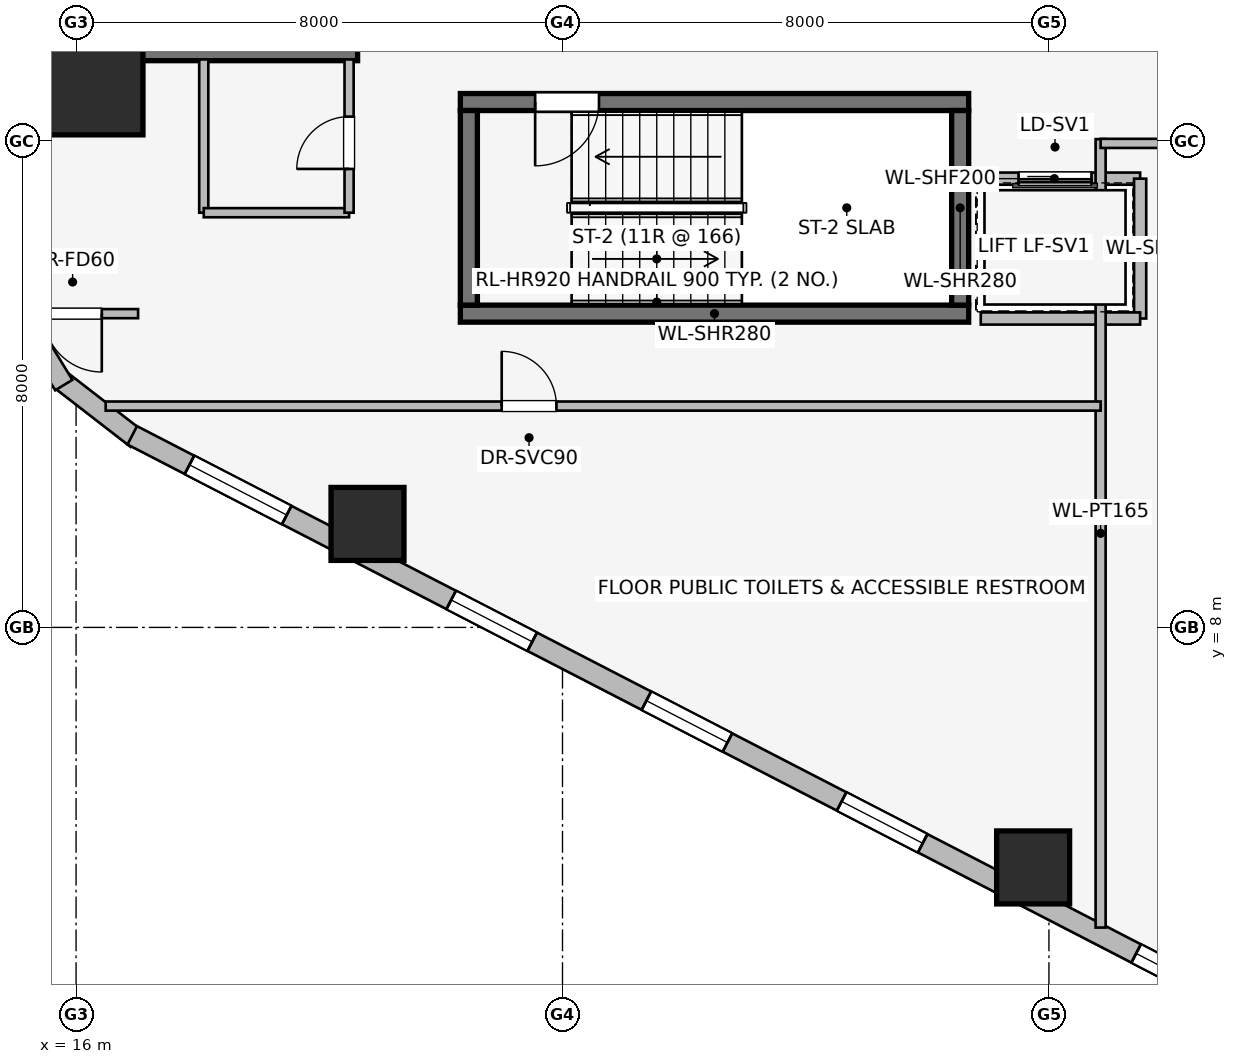
"""IFC4 building model, lengths in metres.
Left out: names, types, materials, properties, quantities, classifications, styles, units other than length and angle.
Written with IfcOpenShell. Run it as: python <this file> out.ifc"""

import sys

from ifc_helpers import new_model, si_unit, direction, frame, frame_2d, origin, origin_2d, place, context, subcontext, project, spatial, rectangle, extrude, element, fill, save


model = new_model("IFC4")
c1 = context("Model", 3, precision=1e-05, world=origin(), true_north=direction((0.0, 1.0)))
c2 = subcontext(c1, "Body", "Model", "MODEL_VIEW")
j1 = project(units=[si_unit("LENGTHUNIT", "METRE"), si_unit("PLANEANGLEUNIT", "RADIAN")], contexts=[c1])
p1 = place(None, origin())
s1 = spatial("IfcSite", under=j1, at=p1, CompositionType="ELEMENT")
p2 = place(p1, origin())
s2 = spatial("IfcBuilding", under=s1, at=p2, CompositionType="ELEMENT")
p3 = place(p2, frame((0.0, 0.0, 45.25)))
s3 = spatial("IfcBuildingStorey", under=s2, at=p3, CompositionType="ELEMENT", Elevation=45.25)
p4 = place(p3, frame((16.87, 17.46, 0.0), z_axis=(0.0, 0.0, 1.0), x_axis=(1.0, 0.0, 0.0)))
e1 = element("IfcWall", 1, at=p4, inside=s3, PredefinedType="SHEAR", context=c2, shape_type="SweptSolid", body=[
    extrude(rectangle(XDim=3.76, YDim=0.28, at=frame_2d((1.88, 0.0))), origin(), (0.0, 0.0, 1.0), 3.65),
])
p5 = place(p3, frame((22.32, 13.16, 0.0), z_axis=(0.0, 0.0, 1.0), x_axis=(1.0, 0.0, 0.0)))
e2 = element("IfcWall", 2, at=p5, inside=s3, PredefinedType="SHEAR", context=c2, shape_type="SweptSolid", body=[
    extrude(rectangle(XDim=8.36, YDim=0.28, at=frame_2d((4.18, 0.0))), origin(), (0.0, 0.0, 1.0), 3.65),
])
p6 = place(p3, frame((30.68, 16.64, 0.0), z_axis=(0.0, 0.0, 1.0), x_axis=(-1.0, 0.0, 0.0)))
e3 = element("IfcWall", 3, at=p6, inside=s3, PredefinedType="SHEAR", context=c2, shape_type="SweptSolid", body=[
    extrude(rectangle(XDim=8.36, YDim=0.28, at=frame_2d((4.18, 0.0))), origin(), (0.0, 0.0, 1.0), 3.65),
])
p7 = place(p6, frame((6.08, 0.0, 0.0)))
e4 = element("IfcOpeningElement", 4, at=p7, cuts=e3, PredefinedType="OPENING", context=c2, shape_type="SweptSolid", body=[
    extrude(rectangle(XDim=1.05, YDim=2.0, at=frame_2d((0.525, 1.0))), frame((0.0, 0.15, 0.0), z_axis=(0.0, -1.0, 0.0), x_axis=(1.0, 0.0, 0.0)), (0.0, 0.0, 1.0), 0.3),
])
for number, where, z_axis, x_axis in (
    (5, (22.46, 16.5, 0.0), (0.0, 0.0, 1.0), (0.0, -1.0, 0.0)),
    (6, (30.54, 13.3, 0.0), (0.0, 0.0, 1.0), (0.0, 1.0, 0.0)),
):
    element("IfcWall", number, at=place(p3, frame(where, z_axis=z_axis, x_axis=x_axis)), inside=s3, PredefinedType="SHEAR", context=c2, shape_type="SweptSolid", body=[
        extrude(rectangle(XDim=3.2, YDim=0.28, at=frame_2d((1.6, 0.0))), origin(), (0.0, 0.0, 1.0), 3.65),
    ])
p8 = place(p3, frame((16.3, 16.9, 0.0), z_axis=(0.0, 0.0, 1.0), x_axis=(1.0, 0.0, 0.0)))
e7 = element("IfcColumn", 7, at=p8, inside=s3, PredefinedType="COLUMN", context=c2, shape_type="SweptSolid", body=[
    extrude(rectangle(XDim=1.6, YDim=1.6, at=origin_2d()), origin(), (0.0, 0.0, 1.0), 3.65),
])
for number, where, z_axis, x_axis in (
    (8, (20.793, 9.702, 0.0), (0.0, 0.0, 1.0), (1.0, 0.0, 0.0)),
    (9, (31.74, 4.053, 0.0), (0.0, 0.0, 1.0), (1.0, 0.0, 0.0)),
):
    element("IfcColumn", number, at=place(p3, frame(where, z_axis=z_axis, x_axis=x_axis)), inside=s3, PredefinedType="COLUMN", context=c2, shape_type="SweptSolid", body=[
        extrude(rectangle(XDim=1.2, YDim=1.2, at=origin_2d()), origin(), (0.0, 0.0, 1.0), 3.65),
    ])
p9 = place(p3, frame((16.998, 11.099, 0.0), z_axis=(0.0, 0.0, 1.0), x_axis=(-0.790691856293, 0.61221433207, 0.0)))
e10 = element("IfcWall", 10, at=p9, inside=s3, PredefinedType="STANDARD", context=c2, shape_type="SweptSolid", body=[
    extrude(rectangle(XDim=1.676, YDim=0.33, at=frame_2d((0.838, 0.0))), origin(), (0.0, 0.0, 1.0), 3.39),
])
p10 = place(p3, frame((15.798, 11.985, 0.0), z_axis=(0.0, 0.0, 1.0), x_axis=(-0.520584129191, 0.853810379671, 0.0)))
e11 = element("IfcWall", 11, at=p10, inside=s3, PredefinedType="STANDARD", context=c2, shape_type="SweptSolid", body=[
    extrude(rectangle(XDim=1.677, YDim=0.33, at=frame_2d((0.838, 0.0))), origin(), (0.0, 0.0, 1.0), 3.39),
])
p11 = place(p3, frame((35.169, 1.743, 0.0), z_axis=(0.0, 0.0, 1.0), x_axis=(-0.888634413993, 0.458616264721, 0.0)))
e12 = element("IfcWall", 12, at=p11, inside=s3, PredefinedType="STANDARD", context=c2, shape_type="SweptSolid", body=[
    extrude(rectangle(XDim=20.531, YDim=0.34, at=frame_2d((10.266, 0.0))), origin(), (0.0, 0.0, 1.0), 2.684),
])
p12 = place(p11, frame((0.902, 0.0, 0.75)))
e13 = element("IfcOpeningElement", 13, at=p12, cuts=e12, PredefinedType="OPENING", context=c2, shape_type="SweptSolid", body=[
    extrude(rectangle(XDim=1.05, YDim=1.4, at=frame_2d((0.525, 0.7))), frame((0.0, 0.18, 0.0), z_axis=(0.0, -1.0, 0.0), x_axis=(1.0, 0.0, 0.0)), (0.0, 0.0, 1.0), 0.36),
])
p13 = place(p11, frame((5.903, 0.0, 0.75)))
e14 = element("IfcOpeningElement", 14, at=p13, cuts=e12, PredefinedType="OPENING", context=c2, shape_type="SweptSolid", body=[
    extrude(rectangle(XDim=1.5, YDim=1.5, at=frame_2d((0.75, 0.75))), frame((0.0, 0.18, 0.0), z_axis=(0.0, -1.0, 0.0), x_axis=(1.0, 0.0, 0.0)), (0.0, 0.0, 1.0), 0.36),
])
p14 = place(p11, frame((9.516, 0.0, 0.75)))
e15 = element("IfcOpeningElement", 15, at=p14, cuts=e12, PredefinedType="OPENING", context=c2, shape_type="SweptSolid", body=[
    extrude(rectangle(XDim=1.5, YDim=1.5, at=frame_2d((0.75, 0.75))), frame((0.0, 0.18, 0.0), z_axis=(0.0, -1.0, 0.0), x_axis=(1.0, 0.0, 0.0)), (0.0, 0.0, 1.0), 0.36),
])
p15 = place(p11, frame((13.129, 0.0, 0.75)))
e16 = element("IfcOpeningElement", 16, at=p15, cuts=e12, PredefinedType="OPENING", context=c2, shape_type="SweptSolid", body=[
    extrude(rectangle(XDim=1.5, YDim=1.5, at=frame_2d((0.75, 0.75))), frame((0.0, 0.18, 0.0), z_axis=(0.0, -1.0, 0.0), x_axis=(1.0, 0.0, 0.0)), (0.0, 0.0, 1.0), 0.36),
])
p16 = place(p11, frame((17.673, 0.0, 0.75)))
e17 = element("IfcOpeningElement", 17, at=p16, cuts=e12, PredefinedType="OPENING", context=c2, shape_type="SweptSolid", body=[
    extrude(rectangle(XDim=1.8, YDim=1.5, at=frame_2d((0.9, 0.75))), frame((0.0, 0.18, 0.0), z_axis=(0.0, -1.0, 0.0), x_axis=(1.0, 0.0, 0.0)), (0.0, 0.0, 1.0), 0.36),
])
p17 = place(p3, frame((33.5, 15.38, 0.0), z_axis=(0.0, 0.0, 1.0), x_axis=(-1.0, 0.0, 0.0)))
e18 = element("IfcWall", 18, at=p17, inside=s3, PredefinedType="PARTITIONING", context=c2, shape_type="SweptSolid", body=[
    extrude(rectangle(XDim=2.82, YDim=0.2, at=frame_2d((1.41, 0.0))), origin(), (0.0, 0.0, 1.0), 3.39),
])
p18 = place(p17, frame((0.8, 0.0, 0.0)))
e19 = element("IfcOpeningElement", 19, at=p18, cuts=e18, PredefinedType="OPENING", context=c2, shape_type="SweptSolid", body=[
    extrude(rectangle(XDim=1.2, YDim=2.2, at=frame_2d((0.6, 1.1))), frame((0.0, 0.11, 0.0), z_axis=(0.0, -1.0, 0.0), x_axis=(1.0, 0.0, 0.0)), (0.0, 0.0, 1.0), 0.22),
])
p19 = place(p3, frame((33.5, 13.08, 0.0), z_axis=(0.0, 0.0, 1.0), x_axis=(0.0, 1.0, 0.0)))
e20 = element("IfcWall", 20, at=p19, inside=s3, PredefinedType="PARTITIONING", context=c2, shape_type="SweptSolid", body=[
    extrude(rectangle(XDim=2.3, YDim=0.2, at=frame_2d((1.15, 0.0))), origin(), (0.0, 0.0, 1.0), 3.39),
])
p20 = place(p3, frame((30.879, 13.08, 0.0), z_axis=(0.0, 0.0, 1.0), x_axis=(1.0, 0.0, 0.0)))
e21 = element("IfcWall", 21, at=p20, inside=s3, PredefinedType="PARTITIONING", context=c2, shape_type="SweptSolid", body=[
    extrude(rectangle(XDim=2.621, YDim=0.2, at=frame_2d((1.311, 0.0))), origin(), (0.0, 0.0, 1.0), 3.39),
])
p21 = place(p3, frame((18.1, 17.34, 0.0), z_axis=(0.0, 0.0, 1.0), x_axis=(0.0, -1.0, 0.0)))
e22 = element("IfcWall", 22, at=p21, inside=s3, PredefinedType="PARTITIONING", context=c2, shape_type="SweptSolid", body=[
    extrude(rectangle(XDim=2.52, YDim=0.15, at=frame_2d((1.26, 0.0))), origin(), (0.0, 0.0, 1.0), 3.39),
])
p22 = place(p3, frame((18.1, 14.82, 0.0), z_axis=(0.0, 0.0, 1.0), x_axis=(1.0, 0.0, 0.0)))
e23 = element("IfcWall", 23, at=p22, inside=s3, PredefinedType="PARTITIONING", context=c2, shape_type="SweptSolid", body=[
    extrude(rectangle(XDim=2.39, YDim=0.15, at=frame_2d((1.195, 0.0))), origin(), (0.0, 0.0, 1.0), 3.39),
])
p23 = place(p3, frame((20.49, 14.82, 0.0), z_axis=(0.0, 0.0, 1.0), x_axis=(0.0, 1.0, 0.0)))
e24 = element("IfcWall", 24, at=p23, inside=s3, PredefinedType="PARTITIONING", context=c2, shape_type="SweptSolid", body=[
    extrude(rectangle(XDim=2.52, YDim=0.15, at=frame_2d((1.26, 0.0))), origin(), (0.0, 0.0, 1.0), 3.39),
])
p24 = place(p23, frame((0.72, 0.0, 0.0)))
e25 = element("IfcOpeningElement", 25, at=p24, cuts=e24, PredefinedType="OPENING", context=c2, shape_type="SweptSolid", body=[
    extrude(rectangle(XDim=0.86, YDim=2.0, at=frame_2d((0.43, 1.0))), frame((0.0, 0.085, 0.0), z_axis=(0.0, -1.0, 0.0), x_axis=(1.0, 0.0, 0.0)), (0.0, 0.0, 1.0), 0.17),
])
p25 = place(p3, frame((32.85, 3.064, 0.0), z_axis=(0.0, 0.0, 1.0), x_axis=(0.0, 1.0, 0.0)))
e26 = element("IfcWall", 26, at=p25, inside=s3, PredefinedType="PARTITIONING", context=c2, shape_type="SweptSolid", body=[
    extrude(rectangle(XDim=12.966, YDim=0.165, at=frame_2d((6.483, 0.0))), origin(), (0.0, 0.0, 1.0), 3.39),
])
p26 = place(p3, frame((16.487, 11.64, 0.0), z_axis=(0.0, 0.0, 1.0), x_axis=(1.0, 0.0, 0.0)))
e27 = element("IfcWall", 27, at=p26, inside=s3, PredefinedType="PARTITIONING", context=c2, shape_type="SweptSolid", body=[
    extrude(rectangle(XDim=16.363, YDim=0.15, at=frame_2d((8.182, 0.0))), origin(), (0.0, 0.0, 1.0), 3.39),
])
p27 = place(p26, frame((6.513, 0.0, 0.0)))
e28 = element("IfcOpeningElement", 28, at=p27, cuts=e27, PredefinedType="OPENING", context=c2, shape_type="SweptSolid", body=[
    extrude(rectangle(XDim=0.9, YDim=2.0, at=frame_2d((0.45, 1.0))), frame((0.0, 0.085, 0.0), z_axis=(0.0, -1.0, 0.0), x_axis=(1.0, 0.0, 0.0)), (0.0, 0.0, 1.0), 0.17),
])
p28 = place(p3, frame((17.02, 13.16, 0.0), z_axis=(0.0, 0.0, 1.0), x_axis=(-1.0, 0.0, 0.0)))
e29 = element("IfcWall", 29, at=p28, inside=s3, PredefinedType="PARTITIONING", context=c2, shape_type="SweptSolid", body=[
    extrude(rectangle(XDim=2.12, YDim=0.15, at=frame_2d((1.06, 0.0))), origin(), (0.0, 0.0, 1.0), 3.39),
])
p29 = place(p28, frame((0.597, 0.0, 0.0)))
e30 = element("IfcOpeningElement", 30, at=p29, cuts=e29, PredefinedType="OPENING", context=c2, shape_type="SweptSolid", body=[
    extrude(rectangle(XDim=0.96, YDim=2.0, at=frame_2d((0.48, 1.0))), frame((0.0, 0.085, 0.0), z_axis=(0.0, -1.0, 0.0), x_axis=(1.0, 0.0, 0.0)), (0.0, 0.0, 1.0), 0.17),
])
p30 = place(p3, frame((32.85, 15.96, 0.0), z_axis=(0.0, 0.0, 1.0), x_axis=(1.0, 0.0, 0.0)))
e31 = element("IfcWall", 31, at=p30, inside=s3, PredefinedType="PARTITIONING", context=c2, shape_type="SweptSolid", body=[
    extrude(rectangle(XDim=5.461, YDim=0.15, at=frame_2d((2.73, 0.0))), origin(), (0.0, 0.0, 1.0), 3.39),
])
p31 = place(p30, frame((2.251, 0.0, 0.0)))
e32 = element("IfcOpeningElement", 32, at=p31, cuts=e31, PredefinedType="OPENING", context=c2, shape_type="SweptSolid", body=[
    extrude(rectangle(XDim=0.96, YDim=2.0, at=frame_2d((0.48, 1.0))), frame((0.0, 0.085, 0.0), z_axis=(0.0, -1.0, 0.0), x_axis=(1.0, 0.0, 0.0)), (0.0, 0.0, 1.0), 0.17),
])
p32 = place(p12, origin())
e33 = element("IfcWindow", 33, at=p32, inside=s3, PartitioningType="SINGLE_PANEL", PredefinedType="WINDOW", context=c2, shape_type="SweptSolid", body=[
    extrude(rectangle(XDim=1.05, YDim=1.4, at=frame_2d((0.525, 0.7))), frame((0.0, 0.03, 0.0), z_axis=(0.0, -1.0, 0.0), x_axis=(1.0, 0.0, 0.0)), (0.0, 0.0, 1.0), 0.06),
])
fill(e13, e33)
p33 = place(p13, origin())
e34 = element("IfcWindow", 34, at=p33, inside=s3, PartitioningType="SINGLE_PANEL", PredefinedType="WINDOW", context=c2, shape_type="SweptSolid", body=[
    extrude(rectangle(XDim=1.5, YDim=1.5, at=frame_2d((0.75, 0.75))), frame((0.0, 0.03, 0.0), z_axis=(0.0, -1.0, 0.0), x_axis=(1.0, 0.0, 0.0)), (0.0, 0.0, 1.0), 0.06),
])
fill(e14, e34)
p34 = place(p14, origin())
e35 = element("IfcWindow", 35, at=p34, inside=s3, PartitioningType="SINGLE_PANEL", PredefinedType="WINDOW", context=c2, shape_type="SweptSolid", body=[
    extrude(rectangle(XDim=1.5, YDim=1.5, at=frame_2d((0.75, 0.75))), frame((0.0, 0.03, 0.0), z_axis=(0.0, -1.0, 0.0), x_axis=(1.0, 0.0, 0.0)), (0.0, 0.0, 1.0), 0.06),
])
fill(e15, e35)
p35 = place(p15, origin())
e36 = element("IfcWindow", 36, at=p35, inside=s3, PartitioningType="SINGLE_PANEL", PredefinedType="WINDOW", context=c2, shape_type="SweptSolid", body=[
    extrude(rectangle(XDim=1.5, YDim=1.5, at=frame_2d((0.75, 0.75))), frame((0.0, 0.03, 0.0), z_axis=(0.0, -1.0, 0.0), x_axis=(1.0, 0.0, 0.0)), (0.0, 0.0, 1.0), 0.06),
])
fill(e16, e36)
p36 = place(p16, origin())
e37 = element("IfcWindow", 37, at=p36, inside=s3, PartitioningType="SINGLE_PANEL", PredefinedType="WINDOW", context=c2, shape_type="SweptSolid", body=[
    extrude(rectangle(XDim=1.8, YDim=1.5, at=frame_2d((0.9, 0.75))), frame((0.0, 0.03, 0.0), z_axis=(0.0, -1.0, 0.0), x_axis=(1.0, 0.0, 0.0)), (0.0, 0.0, 1.0), 0.06),
])
fill(e17, e37)
p37 = place(p7, origin())
e38 = element("IfcDoor", 38, at=p37, inside=s3, OperationType="SINGLE_SWING_RIGHT", PredefinedType="DOOR", context=c2, shape_type="SweptSolid", body=[
    extrude(rectangle(XDim=1.05, YDim=2.0, at=frame_2d((0.525, 1.0))), frame((0.0, 0.025, 0.0), z_axis=(0.0, -1.0, 0.0), x_axis=(1.0, 0.0, 0.0)), (0.0, 0.0, 1.0), 0.05),
])
fill(e4, e38)
p38 = place(p18, origin())
e39 = element("IfcDoor", 39, at=p38, inside=s3, OperationType="SLIDING_TO_RIGHT", PredefinedType="DOOR", context=c2, shape_type="SweptSolid", body=[
    extrude(rectangle(XDim=1.2, YDim=2.2, at=frame_2d((0.6, 1.1))), frame((0.0, 0.025, 0.0), z_axis=(0.0, -1.0, 0.0), x_axis=(1.0, 0.0, 0.0)), (0.0, 0.0, 1.0), 0.05),
])
fill(e19, e39)
p39 = place(p24, origin())
e40 = element("IfcDoor", 40, at=p39, inside=s3, OperationType="SINGLE_SWING_LEFT", PredefinedType="DOOR", context=c2, shape_type="SweptSolid", body=[
    extrude(rectangle(XDim=0.86, YDim=2.0, at=frame_2d((0.43, 1.0))), frame((0.0, 0.025, 0.0), z_axis=(0.0, -1.0, 0.0), x_axis=(1.0, 0.0, 0.0)), (0.0, 0.0, 1.0), 0.05),
])
fill(e25, e40)
p40 = place(p27, origin())
e41 = element("IfcDoor", 41, at=p40, inside=s3, OperationType="SINGLE_SWING_LEFT", PredefinedType="DOOR", context=c2, shape_type="SweptSolid", body=[
    extrude(rectangle(XDim=0.9, YDim=2.0, at=frame_2d((0.45, 1.0))), frame((0.0, 0.025, 0.0), z_axis=(0.0, -1.0, 0.0), x_axis=(1.0, 0.0, 0.0)), (0.0, 0.0, 1.0), 0.05),
])
fill(e28, e41)
p41 = place(p29, origin())
e42 = element("IfcDoor", 42, at=p41, inside=s3, OperationType="SINGLE_SWING_LEFT", PredefinedType="DOOR", context=c2, shape_type="SweptSolid", body=[
    extrude(rectangle(XDim=0.96, YDim=2.0, at=frame_2d((0.48, 1.0))), frame((0.0, 0.025, 0.0), z_axis=(0.0, -1.0, 0.0), x_axis=(1.0, 0.0, 0.0)), (0.0, 0.0, 1.0), 0.05),
])
fill(e30, e42)
save(model, sys.argv[1])
